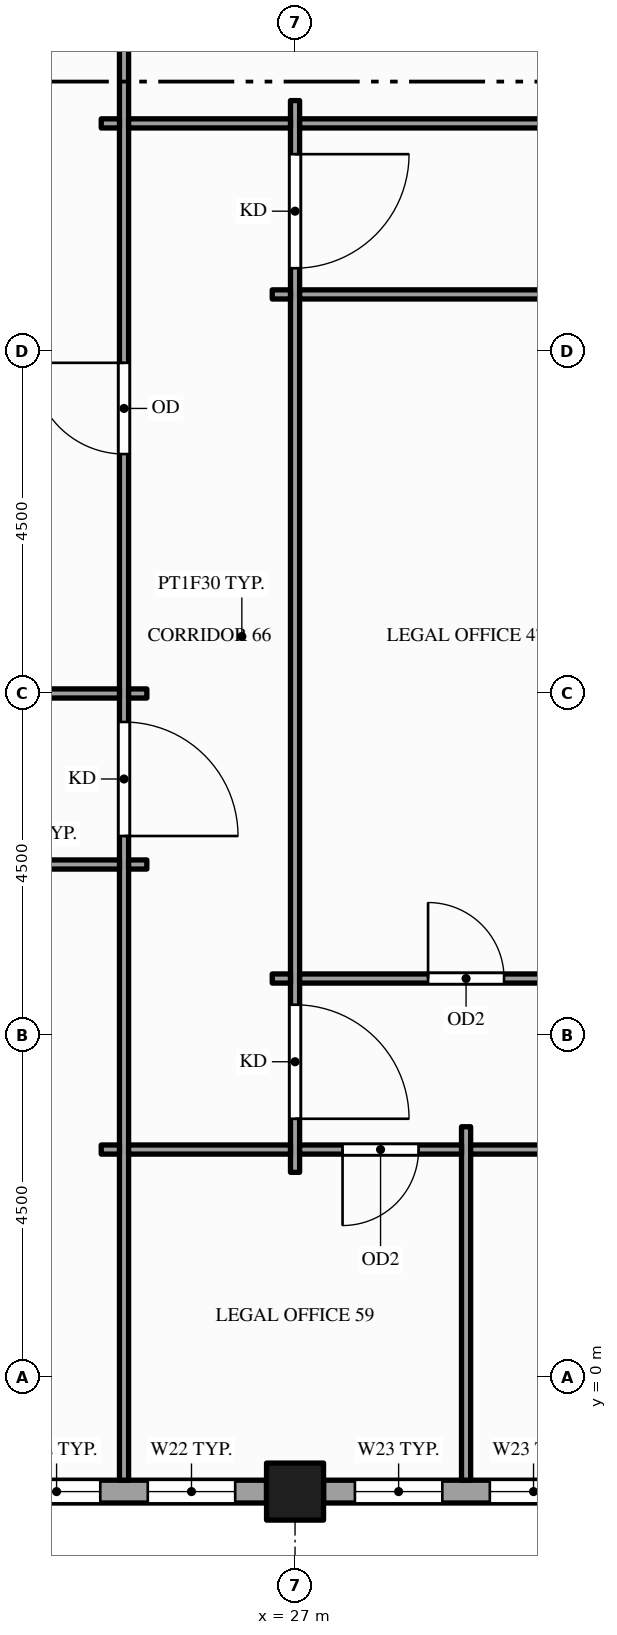
"""IFC4 building model, lengths in metres.
Left out: names, types, materials, properties, quantities, classifications, styles, units other than length and angle.
Written with IfcOpenShell. Run it as: python <this file> out.ifc"""

import sys

from ifc_helpers import new_model, si_unit, direction, frame, frame_2d, origin, origin_2d, place, context, subcontext, project, spatial, rectangle, hollow_rectangle, extrude, element, fill, save


model = new_model("IFC4")
c1 = context("Model", 3, precision=1e-05, world=origin(), true_north=direction((0.0, 1.0)))
c2 = subcontext(c1, "Body", "Model", "MODEL_VIEW")
j1 = project(units=[si_unit("LENGTHUNIT", "METRE"), si_unit("PLANEANGLEUNIT", "RADIAN")], contexts=[c1])
p1 = place(None, origin())
s1 = spatial("IfcSite", under=j1, at=p1, CompositionType="ELEMENT")
p2 = place(p1, origin())
s2 = spatial("IfcBuilding", under=s1, at=p2, CompositionType="ELEMENT")
p3 = place(p2, frame((0.0, 0.0, 223.0)))
s3 = spatial("IfcBuildingStorey", under=s2, at=p3, CompositionType="ELEMENT", Elevation=223.0)
p4 = place(p3, frame((27.0, -1.5, -0.15), z_axis=(0.0, 0.0, 1.0), x_axis=(1.0, 0.0, 0.0)))
e1 = element("IfcColumn", 1, at=p4, inside=s3, PredefinedType="COLUMN", context=c2, shape_type="SweptSolid", body=[
    extrude(hollow_rectangle(XDim=0.75, YDim=0.75, WallThickness=0.036, at=origin_2d()), origin(), (0.0, 0.0, 1.0), 4.0),
])
p5 = place(p3, frame((22.875, -1.5, 0.0), z_axis=(0.0, 0.0, 1.0), x_axis=(1.0, 0.0, 0.0)))
e2 = element("IfcWall", 2, at=p5, inside=s3, PredefinedType="STANDARD", context=c2, shape_type="SweptSolid", body=[
    extrude(rectangle(XDim=3.75, YDim=0.3, at=frame_2d((1.875, 0.0))), origin(), (0.0, 0.0, 1.0), 2.76),
])
p6 = place(p5, frame((0.413, 0.0, 0.9)))
e3 = element("IfcOpeningElement", 3, at=p6, cuts=e2, PredefinedType="OPENING", context=c2, shape_type="SweptSolid", body=[
    extrude(rectangle(XDim=1.15, YDim=1.5, at=frame_2d((0.575, 0.75))), frame((0.0, 0.16, 0.0), z_axis=(0.0, -1.0, 0.0), x_axis=(1.0, 0.0, 0.0)), (0.0, 0.0, 1.0), 0.32),
])
p7 = place(p5, frame((2.188, 0.0, 0.9)))
e4 = element("IfcOpeningElement", 4, at=p7, cuts=e2, PredefinedType="OPENING", context=c2, shape_type="SweptSolid", body=[
    extrude(rectangle(XDim=1.15, YDim=1.5, at=frame_2d((0.575, 0.75))), frame((0.0, 0.16, 0.0), z_axis=(0.0, -1.0, 0.0), x_axis=(1.0, 0.0, 0.0)), (0.0, 0.0, 1.0), 0.32),
])
p8 = place(p3, frame((27.375, -1.5, 0.0), z_axis=(0.0, 0.0, 1.0), x_axis=(1.0, 0.0, 0.0)))
e5 = element("IfcWall", 5, at=p8, inside=s3, PredefinedType="STANDARD", context=c2, shape_type="SweptSolid", body=[
    extrude(rectangle(XDim=3.75, YDim=0.3, at=frame_2d((1.875, 0.0))), origin(), (0.0, 0.0, 1.0), 2.87),
])
p9 = place(p8, frame((0.413, 0.0, 0.9)))
e6 = element("IfcOpeningElement", 6, at=p9, cuts=e5, PredefinedType="OPENING", context=c2, shape_type="SweptSolid", body=[
    extrude(rectangle(XDim=1.15, YDim=1.75, at=frame_2d((0.575, 0.875))), frame((0.0, 0.16, 0.0), z_axis=(0.0, -1.0, 0.0), x_axis=(1.0, 0.0, 0.0)), (0.0, 0.0, 1.0), 0.32),
])
p10 = place(p8, frame((2.188, 0.0, 0.9)))
e7 = element("IfcOpeningElement", 7, at=p10, cuts=e5, PredefinedType="OPENING", context=c2, shape_type="SweptSolid", body=[
    extrude(rectangle(XDim=1.15, YDim=1.75, at=frame_2d((0.575, 0.875))), frame((0.0, 0.16, 0.0), z_axis=(0.0, -1.0, 0.0), x_axis=(1.0, 0.0, 0.0)), (0.0, 0.0, 1.0), 0.32),
])
p11 = place(p3, frame((24.75, -1.35, 0.0), z_axis=(0.0, 0.0, 1.0), x_axis=(0.0, 1.0, 0.0)))
e8 = element("IfcWall", 8, at=p11, inside=s3, PredefinedType="PARTITIONING", context=c2, shape_type="SweptSolid", body=[
    extrude(rectangle(XDim=24.101, YDim=0.12, at=frame_2d((12.05, 0.0))), origin(), (0.0, 0.0, 1.0), 2.76),
])
p12 = place(p11, frame((8.475, 0.0, 0.0)))
e9 = element("IfcOpeningElement", 9, at=p12, cuts=e8, PredefinedType="OPENING", context=c2, shape_type="SweptSolid", body=[
    extrude(rectangle(XDim=1.5, YDim=2.1, at=frame_2d((0.75, 1.05))), frame((0.0, 0.07, 0.0), z_axis=(0.0, -1.0, 0.0), x_axis=(1.0, 0.0, 0.0)), (0.0, 0.0, 1.0), 0.14),
])
p13 = place(p11, frame((13.5, 0.0, 0.0)))
e10 = element("IfcOpeningElement", 10, at=p13, cuts=e8, PredefinedType="OPENING", context=c2, shape_type="SweptSolid", body=[
    extrude(rectangle(XDim=1.2, YDim=2.1, at=frame_2d((0.6, 1.05))), frame((0.0, 0.07, 0.0), z_axis=(0.0, -1.0, 0.0), x_axis=(1.0, 0.0, 0.0)), (0.0, 0.0, 1.0), 0.14),
])
p14 = place(p3, frame((27.0, 2.7, 0.0), z_axis=(0.0, 0.0, 1.0), x_axis=(0.0, 1.0, 0.0)))
e11 = element("IfcWall", 11, at=p14, inside=s3, PredefinedType="PARTITIONING", context=c2, shape_type="SweptSolid", body=[
    extrude(rectangle(XDim=14.1, YDim=0.12, at=frame_2d((7.05, 0.0))), origin(), (0.0, 0.0, 1.0), 2.87),
])
p15 = place(p14, frame((0.705, 0.0, 0.0)))
e12 = element("IfcOpeningElement", 12, at=p15, cuts=e11, PredefinedType="OPENING", context=c2, shape_type="SweptSolid", body=[
    extrude(rectangle(XDim=1.5, YDim=2.1, at=frame_2d((0.75, 1.05))), frame((0.0, 0.07, 0.0), z_axis=(0.0, -1.0, 0.0), x_axis=(1.0, 0.0, 0.0)), (0.0, 0.0, 1.0), 0.14),
])
p16 = place(p14, frame((11.895, 0.0, 0.0)))
e13 = element("IfcOpeningElement", 13, at=p16, cuts=e11, PredefinedType="OPENING", context=c2, shape_type="SweptSolid", body=[
    extrude(rectangle(XDim=1.5, YDim=2.1, at=frame_2d((0.75, 1.05))), frame((0.0, 0.07, 0.0), z_axis=(0.0, -1.0, 0.0), x_axis=(1.0, 0.0, 0.0)), (0.0, 0.0, 1.0), 0.14),
])
p17 = place(p3, frame((29.25, -1.35, 0.0), z_axis=(0.0, 0.0, 1.0), x_axis=(0.0, 1.0, 0.0)))
e14 = element("IfcWall", 14, at=p17, inside=s3, PredefinedType="PARTITIONING", context=c2, shape_type="SweptSolid", body=[
    extrude(rectangle(XDim=4.65, YDim=0.12, at=frame_2d((2.325, 0.0))), origin(), (0.0, 0.0, 1.0), 2.87),
])
p18 = place(p3, frame((24.45, 3.0, 0.0), z_axis=(0.0, 0.0, 1.0), x_axis=(1.0, 0.0, 0.0)))
e15 = element("IfcWall", 15, at=p18, inside=s3, PredefinedType="PARTITIONING", context=c2, shape_type="SweptSolid", body=[
    extrude(rectangle(XDim=0.24, YDim=0.12, at=frame_2d((0.12, 0.0))), origin(), (0.0, 0.0, 1.0), 2.76),
])
p19 = place(p3, frame((24.81, 3.0, 0.0), z_axis=(0.0, 0.0, 1.0), x_axis=(1.0, 0.0, 0.0)))
e16 = element("IfcWall", 16, at=p19, inside=s3, PredefinedType="PARTITIONING", context=c2, shape_type="SweptSolid", body=[
    extrude(rectangle(XDim=2.13, YDim=0.12, at=frame_2d((1.065, 0.0))), origin(), (0.0, 0.0, 1.0), 2.76),
])
p20 = place(p3, frame((27.06, 3.0, 0.0), z_axis=(0.0, 0.0, 1.0), x_axis=(1.0, 0.0, 0.0)))
e17 = element("IfcWall", 17, at=p20, inside=s3, PredefinedType="PARTITIONING", context=c2, shape_type="SweptSolid", body=[
    extrude(rectangle(XDim=2.13, YDim=0.12, at=frame_2d((1.065, 0.0))), origin(), (0.0, 0.0, 1.0), 2.87),
])
p21 = place(p20, frame((0.565, 0.0, 0.0)))
e18 = element("IfcOpeningElement", 18, at=p21, cuts=e17, PredefinedType="OPENING", context=c2, shape_type="SweptSolid", body=[
    extrude(rectangle(XDim=1.0, YDim=2.1, at=frame_2d((0.5, 1.05))), frame((0.0, 0.07, 0.0), z_axis=(0.0, -1.0, 0.0), x_axis=(1.0, 0.0, 0.0)), (0.0, 0.0, 1.0), 0.14),
])
p22 = place(p3, frame((29.31, 3.0, 0.0), z_axis=(0.0, 0.0, 1.0), x_axis=(1.0, 0.0, 0.0)))
e19 = element("IfcWall", 19, at=p22, inside=s3, PredefinedType="PARTITIONING", context=c2, shape_type="SweptSolid", body=[
    extrude(rectangle(XDim=4.38, YDim=0.12, at=frame_2d((2.19, 0.0))), origin(), (0.0, 0.0, 1.0), 2.87),
])
p23 = place(p22, frame((1.69, 0.0, 0.0)))
e20 = element("IfcOpeningElement", 20, at=p23, cuts=e19, PredefinedType="OPENING", context=c2, shape_type="SweptSolid", body=[
    extrude(rectangle(XDim=1.0, YDim=2.1, at=frame_2d((0.5, 1.05))), frame((0.0, 0.07, 0.0), z_axis=(0.0, -1.0, 0.0), x_axis=(1.0, 0.0, 0.0)), (0.0, 0.0, 1.0), 0.14),
])
p24 = place(p3, frame((26.7, 5.25, 0.0), z_axis=(0.0, 0.0, 1.0), x_axis=(1.0, 0.0, 0.0)))
e21 = element("IfcWall", 21, at=p24, inside=s3, PredefinedType="PARTITIONING", context=c2, shape_type="SweptSolid", body=[
    extrude(rectangle(XDim=0.24, YDim=0.12, at=frame_2d((0.12, 0.0))), origin(), (0.0, 0.0, 1.0), 2.87),
])
p25 = place(p3, frame((27.06, 5.25, 0.0), z_axis=(0.0, 0.0, 1.0), x_axis=(1.0, 0.0, 0.0)))
e22 = element("IfcWall", 22, at=p25, inside=s3, PredefinedType="PARTITIONING", context=c2, shape_type="SweptSolid", body=[
    extrude(rectangle(XDim=4.38, YDim=0.12, at=frame_2d((2.19, 0.0))), origin(), (0.0, 0.0, 1.0), 2.87),
])
p26 = place(p25, frame((1.69, 0.0, 0.0)))
e23 = element("IfcOpeningElement", 23, at=p26, cuts=e22, PredefinedType="OPENING", context=c2, shape_type="SweptSolid", body=[
    extrude(rectangle(XDim=1.0, YDim=2.1, at=frame_2d((0.5, 1.05))), frame((0.0, 0.07, 0.0), z_axis=(0.0, -1.0, 0.0), x_axis=(1.0, 0.0, 0.0)), (0.0, 0.0, 1.0), 0.14),
])
p27 = place(p3, frame((18.06, 6.75, 0.0), z_axis=(0.0, 0.0, 1.0), x_axis=(1.0, 0.0, 0.0)))
e24 = element("IfcWall", 24, at=p27, inside=s3, PredefinedType="PARTITIONING", context=c2, shape_type="SweptSolid", body=[
    extrude(rectangle(XDim=6.63, YDim=0.12, at=frame_2d((3.315, 0.0))), origin(), (0.0, 0.0, 1.0), 2.76),
])
p28 = place(p27, frame((2.865, 0.0, 0.0)))
e25 = element("IfcOpeningElement", 25, at=p28, cuts=e24, PredefinedType="OPENING", context=c2, shape_type="SweptSolid", body=[
    extrude(rectangle(XDim=0.9, YDim=2.1, at=frame_2d((0.45, 1.05))), frame((0.0, 0.07, 0.0), z_axis=(0.0, -1.0, 0.0), x_axis=(1.0, 0.0, 0.0)), (0.0, 0.0, 1.0), 0.14),
])
p29 = place(p3, frame((24.81, 6.75, 0.0), z_axis=(0.0, 0.0, 1.0), x_axis=(1.0, 0.0, 0.0)))
e26 = element("IfcWall", 26, at=p29, inside=s3, PredefinedType="PARTITIONING", context=c2, shape_type="SweptSolid", body=[
    extrude(rectangle(XDim=0.24, YDim=0.12, at=frame_2d((0.12, 0.0))), origin(), (0.0, 0.0, 1.0), 2.76),
])
p30 = place(p3, frame((11.31, 9.0, 0.0), z_axis=(0.0, 0.0, 1.0), x_axis=(1.0, 0.0, 0.0)))
e27 = element("IfcWall", 27, at=p30, inside=s3, PredefinedType="PARTITIONING", context=c2, shape_type="SweptSolid", body=[
    extrude(rectangle(XDim=13.38, YDim=0.12, at=frame_2d((6.69, 0.0))), origin(), (0.0, 0.0, 1.0), 2.76),
])
p31 = place(p30, frame((3.54, 0.0, 0.0)))
e28 = element("IfcOpeningElement", 28, at=p31, cuts=e27, PredefinedType="OPENING", context=c2, shape_type="SweptSolid", body=[
    extrude(rectangle(XDim=1.8, YDim=2.1, at=frame_2d((0.9, 1.05))), frame((0.0, 0.07, 0.0), z_axis=(0.0, -1.0, 0.0), x_axis=(1.0, 0.0, 0.0)), (0.0, 0.0, 1.0), 0.14),
])
p32 = place(p3, frame((24.81, 9.0, 0.0), z_axis=(0.0, 0.0, 1.0), x_axis=(1.0, 0.0, 0.0)))
e29 = element("IfcWall", 29, at=p32, inside=s3, PredefinedType="PARTITIONING", context=c2, shape_type="SweptSolid", body=[
    extrude(rectangle(XDim=0.24, YDim=0.12, at=frame_2d((0.12, 0.0))), origin(), (0.0, 0.0, 1.0), 2.76),
])
p33 = place(p3, frame((26.7, 14.25, 0.0), z_axis=(0.0, 0.0, 1.0), x_axis=(1.0, 0.0, 0.0)))
e30 = element("IfcWall", 30, at=p33, inside=s3, PredefinedType="PARTITIONING", context=c2, shape_type="SweptSolid", body=[
    extrude(rectangle(XDim=0.24, YDim=0.12, at=frame_2d((0.12, 0.0))), origin(), (0.0, 0.0, 1.0), 2.87),
])
p34 = place(p3, frame((27.06, 14.25, 0.0), z_axis=(0.0, 0.0, 1.0), x_axis=(1.0, 0.0, 0.0)))
e31 = element("IfcWall", 31, at=p34, inside=s3, PredefinedType="PARTITIONING", context=c2, shape_type="SweptSolid", body=[
    extrude(rectangle(XDim=4.38, YDim=0.12, at=frame_2d((2.19, 0.0))), origin(), (0.0, 0.0, 1.0), 2.87),
])
p35 = place(p3, frame((24.45, 16.5, 0.0), z_axis=(0.0, 0.0, 1.0), x_axis=(1.0, 0.0, 0.0)))
e32 = element("IfcWall", 32, at=p35, inside=s3, PredefinedType="PARTITIONING", context=c2, shape_type="SweptSolid", body=[
    extrude(rectangle(XDim=0.24, YDim=0.12, at=frame_2d((0.12, 0.0))), origin(), (0.0, 0.0, 1.0), 2.76),
])
p36 = place(p3, frame((24.81, 16.5, 0.0), z_axis=(0.0, 0.0, 1.0), x_axis=(1.0, 0.0, 0.0)))
e33 = element("IfcWall", 33, at=p36, inside=s3, PredefinedType="PARTITIONING", context=c2, shape_type="SweptSolid", body=[
    extrude(rectangle(XDim=2.13, YDim=0.12, at=frame_2d((1.065, 0.0))), origin(), (0.0, 0.0, 1.0), 2.76),
])
p37 = place(p3, frame((27.06, 16.5, 0.0), z_axis=(0.0, 0.0, 1.0), x_axis=(1.0, 0.0, 0.0)))
e34 = element("IfcWall", 34, at=p37, inside=s3, PredefinedType="PARTITIONING", context=c2, shape_type="SweptSolid", body=[
    extrude(rectangle(XDim=13.38, YDim=0.12, at=frame_2d((6.69, 0.0))), origin(), (0.0, 0.0, 1.0), 2.87),
])
p38 = place(p37, frame((5.79, 0.0, 0.0)))
e35 = element("IfcOpeningElement", 35, at=p38, cuts=e34, PredefinedType="OPENING", context=c2, shape_type="SweptSolid", body=[
    extrude(rectangle(XDim=1.8, YDim=2.1, at=frame_2d((0.9, 1.05))), frame((0.0, 0.07, 0.0), z_axis=(0.0, -1.0, 0.0), x_axis=(1.0, 0.0, 0.0)), (0.0, 0.0, 1.0), 0.14),
])
p39 = place(p6, origin())
e36 = element("IfcWindow", 36, at=p39, inside=s3, PartitioningType="SINGLE_PANEL", PredefinedType="WINDOW", context=c2, shape_type="SweptSolid", body=[
    extrude(rectangle(XDim=1.15, YDim=1.5, at=frame_2d((0.575, 0.75))), frame((0.0, 0.03, 0.0), z_axis=(0.0, -1.0, 0.0), x_axis=(1.0, 0.0, 0.0)), (0.0, 0.0, 1.0), 0.06),
])
fill(e3, e36)
p40 = place(p7, origin())
e37 = element("IfcWindow", 37, at=p40, inside=s3, PartitioningType="SINGLE_PANEL", PredefinedType="WINDOW", context=c2, shape_type="SweptSolid", body=[
    extrude(rectangle(XDim=1.15, YDim=1.5, at=frame_2d((0.575, 0.75))), frame((0.0, 0.03, 0.0), z_axis=(0.0, -1.0, 0.0), x_axis=(1.0, 0.0, 0.0)), (0.0, 0.0, 1.0), 0.06),
])
fill(e4, e37)
p41 = place(p9, origin())
e38 = element("IfcWindow", 38, at=p41, inside=s3, PartitioningType="SINGLE_PANEL", PredefinedType="WINDOW", context=c2, shape_type="SweptSolid", body=[
    extrude(rectangle(XDim=1.15, YDim=1.75, at=frame_2d((0.575, 0.875))), frame((0.0, 0.03, 0.0), z_axis=(0.0, -1.0, 0.0), x_axis=(1.0, 0.0, 0.0)), (0.0, 0.0, 1.0), 0.06),
])
fill(e6, e38)
p42 = place(p10, origin())
e39 = element("IfcWindow", 39, at=p42, inside=s3, PartitioningType="SINGLE_PANEL", PredefinedType="WINDOW", context=c2, shape_type="SweptSolid", body=[
    extrude(rectangle(XDim=1.15, YDim=1.75, at=frame_2d((0.575, 0.875))), frame((0.0, 0.03, 0.0), z_axis=(0.0, -1.0, 0.0), x_axis=(1.0, 0.0, 0.0)), (0.0, 0.0, 1.0), 0.06),
])
fill(e7, e39)
p43 = place(p12, origin())
e40 = element("IfcDoor", 40, at=p43, inside=s3, OperationType="SINGLE_SWING_LEFT", PredefinedType="DOOR", context=c2, shape_type="SweptSolid", body=[
    extrude(rectangle(XDim=1.5, YDim=2.1, at=frame_2d((0.75, 1.05))), frame((0.0, 0.025, 0.0), z_axis=(0.0, -1.0, 0.0), x_axis=(1.0, 0.0, 0.0)), (0.0, 0.0, 1.0), 0.05),
])
fill(e9, e40)
p44 = place(p15, origin())
e41 = element("IfcDoor", 41, at=p44, inside=s3, OperationType="SINGLE_SWING_LEFT", PredefinedType="DOOR", context=c2, shape_type="SweptSolid", body=[
    extrude(rectangle(XDim=1.5, YDim=2.1, at=frame_2d((0.75, 1.05))), frame((0.0, 0.025, 0.0), z_axis=(0.0, -1.0, 0.0), x_axis=(1.0, 0.0, 0.0)), (0.0, 0.0, 1.0), 0.05),
])
fill(e12, e41)
p45 = place(p16, origin())
e42 = element("IfcDoor", 42, at=p45, inside=s3, OperationType="SINGLE_SWING_RIGHT", PredefinedType="DOOR", context=c2, shape_type="SweptSolid", body=[
    extrude(rectangle(XDim=1.5, YDim=2.1, at=frame_2d((0.75, 1.05))), frame((0.0, 0.025, 0.0), z_axis=(0.0, -1.0, 0.0), x_axis=(1.0, 0.0, 0.0)), (0.0, 0.0, 1.0), 0.05),
])
fill(e13, e42)
p46 = place(p26, origin())
e43 = element("IfcDoor", 43, at=p46, inside=s3, OperationType="SINGLE_SWING_LEFT", PredefinedType="DOOR", context=c2, shape_type="SweptSolid", body=[
    extrude(rectangle(XDim=1.0, YDim=2.1, at=frame_2d((0.5, 1.05))), frame((0.0, 0.025, 0.0), z_axis=(0.0, -1.0, 0.0), x_axis=(1.0, 0.0, 0.0)), (0.0, 0.0, 1.0), 0.05),
])
fill(e23, e43)
p47 = place(p21, origin())
e44 = element("IfcDoor", 44, at=p47, inside=s3, OperationType="SINGLE_SWING_LEFT", PredefinedType="DOOR", context=c2, shape_type="SweptSolid", body=[
    extrude(rectangle(XDim=1.0, YDim=2.1, at=frame_2d((0.5, 1.05))), frame((0.0, 0.025, 0.0), z_axis=(0.0, -1.0, 0.0), x_axis=(1.0, 0.0, 0.0)), (0.0, 0.0, 1.0), 0.05),
])
fill(e18, e44)
p48 = place(p13, origin())
e45 = element("IfcDoor", 45, at=p48, inside=s3, OperationType="SINGLE_SWING_RIGHT", PredefinedType="DOOR", context=c2, shape_type="SweptSolid", body=[
    extrude(rectangle(XDim=1.2, YDim=2.1, at=frame_2d((0.6, 1.05))), frame((0.0, 0.025, 0.0), z_axis=(0.0, -1.0, 0.0), x_axis=(1.0, 0.0, 0.0)), (0.0, 0.0, 1.0), 0.05),
])
fill(e10, e45)
save(model, sys.argv[1])
